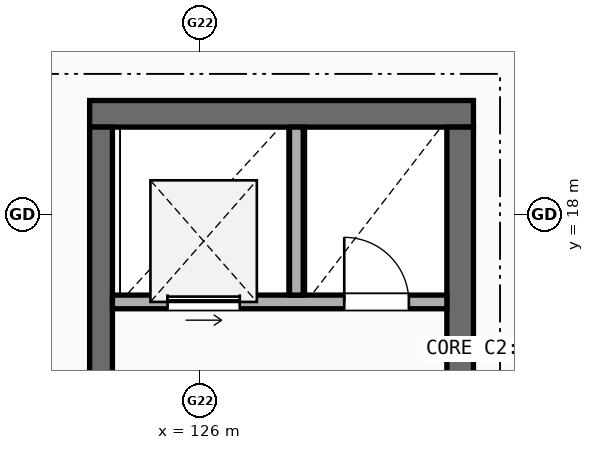
"""IFC4 building model, lengths in metres.
Left out: names, types, materials, properties, quantities, classifications, styles, units other than length and angle.
Written with IfcOpenShell. Run it as: python <this file> out.ifc"""

import sys

from ifc_helpers import new_model, si_unit, direction, frame, frame_2d, origin, place, context, subcontext, project, spatial, rectangle, extrude, element, fill, save


model = new_model("IFC4")
c1 = context("Model", 3, precision=1e-05, world=origin(), true_north=direction((0.0, 1.0)))
c2 = subcontext(c1, "Body", "Model", "MODEL_VIEW")
j1 = project(units=[si_unit("LENGTHUNIT", "METRE"), si_unit("PLANEANGLEUNIT", "RADIAN")], contexts=[c1])
p1 = place(None, origin())
s1 = spatial("IfcSite", under=j1, at=p1, CompositionType="ELEMENT")
p2 = place(p1, origin())
s2 = spatial("IfcBuilding", under=s1, at=p2, CompositionType="ELEMENT")
p3 = place(p2, frame((0.0, 0.0, 14.1)))
s3 = spatial("IfcBuildingStorey", under=s2, at=p3, CompositionType="ELEMENT", Elevation=14.1)
p4 = place(p3, frame((129.6, 19.325, 0.0), z_axis=(0.0, 0.0, 1.0), x_axis=(-1.0, 0.0, 0.0)))
e1 = element("IfcWall", 1, at=p4, inside=s3, PredefinedType="SHEAR", context=c2, shape_type="SweptSolid", body=[
    extrude(rectangle(XDim=5.05, YDim=0.35, at=frame_2d((2.525, 0.0))), origin(), (0.0, 0.0, 1.0), 2.95),
])
p5 = place(p3, frame((129.425, 12.75, 0.0), z_axis=(0.0, 0.0, 1.0), x_axis=(0.0, 1.0, 0.0)))
e2 = element("IfcWall", 2, at=p5, inside=s3, PredefinedType="SHEAR", context=c2, shape_type="SweptSolid", body=[
    extrude(rectangle(XDim=6.4, YDim=0.35, at=frame_2d((3.2, 0.0))), origin(), (0.0, 0.0, 1.0), 2.95),
])
p6 = place(p3, frame((124.7, 15.7, 0.0), z_axis=(0.0, 0.0, 1.0), x_axis=(0.0, 1.0, 0.0)))
e3 = element("IfcWall", 3, at=p6, inside=s3, PredefinedType="SHEAR", context=c2, shape_type="SweptSolid", body=[
    extrude(rectangle(XDim=3.45, YDim=0.3, at=frame_2d((1.725, 0.0))), origin(), (0.0, 0.0, 1.0), 2.95),
])
p7 = place(p3, frame((124.85, 16.85, 0.0), z_axis=(0.0, 0.0, 1.0), x_axis=(1.0, 0.0, 0.0)))
e4 = element("IfcWall", 4, at=p7, inside=s3, PredefinedType="SOLIDWALL", context=c2, shape_type="SweptSolid", body=[
    extrude(rectangle(XDim=4.4, YDim=0.18, at=frame_2d((2.2, 0.0))), origin(), (0.0, 0.0, 1.0), 2.95),
])
p8 = place(p7, frame((0.725, 0.0, 0.0)))
e5 = element("IfcOpeningElement", 5, at=p8, cuts=e4, PredefinedType="OPENING", context=c2, shape_type="SweptSolid", body=[
    extrude(rectangle(XDim=0.95, YDim=2.15, at=frame_2d((0.475, 1.075))), frame((0.0, 0.1, 0.0), z_axis=(0.0, -1.0, 0.0), x_axis=(1.0, 0.0, 0.0)), (0.0, 0.0, 1.0), 0.2),
])
p9 = place(p7, frame((3.05, 0.0, 0.0)))
e6 = element("IfcOpeningElement", 6, at=p9, cuts=e4, PredefinedType="OPENING", context=c2, shape_type="SweptSolid", body=[
    extrude(rectangle(XDim=0.85, YDim=2.1, at=frame_2d((0.425, 1.05))), frame((0.0, 0.1, 0.0), z_axis=(0.0, -1.0, 0.0), x_axis=(1.0, 0.0, 0.0)), (0.0, 0.0, 1.0), 0.2),
])
p10 = place(p3, frame((127.27, 16.94, 0.0), z_axis=(0.0, 0.0, 1.0), x_axis=(0.0, 1.0, 0.0)))
e7 = element("IfcWall", 7, at=p10, inside=s3, PredefinedType="SOLIDWALL", context=c2, shape_type="SweptSolid", body=[
    extrude(rectangle(XDim=2.21, YDim=0.18, at=frame_2d((1.105, 0.0))), origin(), (0.0, 0.0, 1.0), 2.95),
])
p11 = place(p8, origin())
e8 = element("IfcDoor", 8, at=p11, inside=s3, OperationType="SLIDING_TO_LEFT", PredefinedType="DOOR", context=c2, shape_type="SweptSolid", body=[
    extrude(rectangle(XDim=0.95, YDim=2.15, at=frame_2d((0.475, 1.075))), frame((0.0, 0.025, 0.0), z_axis=(0.0, -1.0, 0.0), x_axis=(1.0, 0.0, 0.0)), (0.0, 0.0, 1.0), 0.05),
])
fill(e5, e8)
p12 = place(p9, frame((0.85, 0.0, 0.0), z_axis=(0.0, 0.0, 1.0), x_axis=(-1.0, 0.0, 0.0)))
e9 = element("IfcDoor", 9, at=p12, inside=s3, OperationType="SINGLE_SWING_LEFT", PredefinedType="DOOR", context=c2, shape_type="SweptSolid", body=[
    extrude(rectangle(XDim=0.85, YDim=2.1, at=frame_2d((0.425, 1.05))), frame((0.0, 0.025, 0.0), z_axis=(0.0, -1.0, 0.0), x_axis=(1.0, 0.0, 0.0)), (0.0, 0.0, 1.0), 0.05),
])
fill(e6, e9)
save(model, sys.argv[1])
